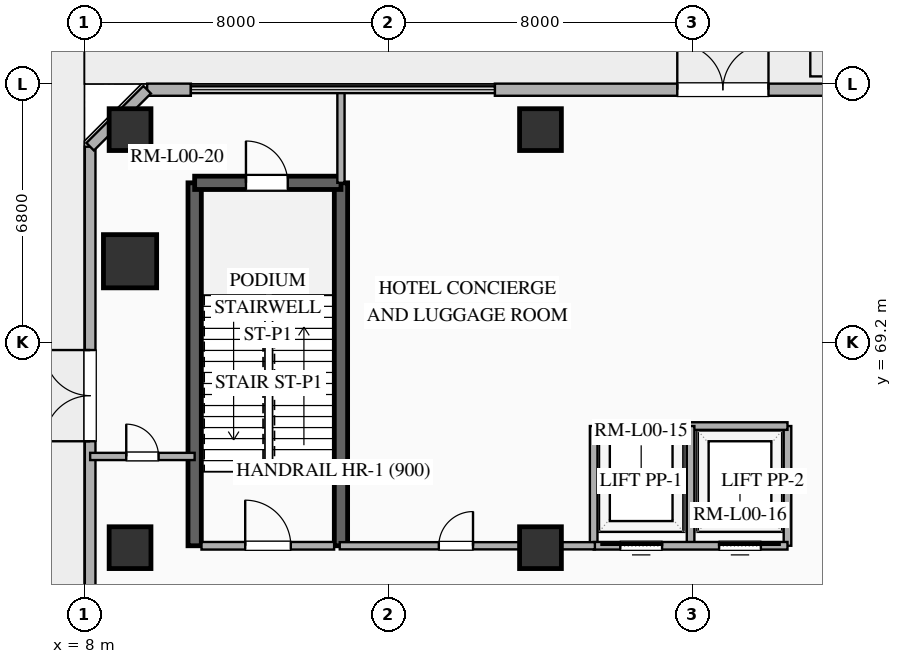
"""IFC4 building model, lengths in metres.
Left out: names, types, materials, properties, quantities, classifications, styles, units other than length and angle.
Written with IfcOpenShell. Run it as: python <this file> out.ifc"""

import sys

from ifc_helpers import new_model, si_unit, direction, frame, frame_2d, origin, origin_2d, place, context, subcontext, project, spatial, rectangle, extrude, element, fill, save


model = new_model("IFC4")
c1 = context("Model", 3, precision=1e-05, world=origin(), true_north=direction((0.0, 1.0)))
c2 = subcontext(c1, "Body", "Model", "MODEL_VIEW")
j1 = project(units=[si_unit("LENGTHUNIT", "METRE"), si_unit("PLANEANGLEUNIT", "RADIAN")], contexts=[c1])
p1 = place(None, origin())
s1 = spatial("IfcSite", under=j1, at=p1, CompositionType="ELEMENT")
p2 = place(p1, origin())
s2 = spatial("IfcBuilding", under=s1, at=p2, CompositionType="ELEMENT")
p3 = place(p2, origin())
s3 = spatial("IfcBuildingStorey", under=s2, at=p3, CompositionType="ELEMENT", Elevation=0.0)
for number, where, z_axis, x_axis in (
    (1, (9.2, 74.8, 0.0), (0.0, 0.0, 1.0), (1.0, 0.0, 0.0)),
    (2, (9.2, 63.8, 0.0), (0.0, 0.0, 1.0), (1.0, 0.0, 0.0)),
    (3, (20.0, 74.8, 0.0), (0.0, 0.0, 1.0), (1.0, 0.0, 0.0)),
    (4, (20.0, 63.8, 0.0), (0.0, 0.0, 1.0), (1.0, 0.0, 0.0)),
):
    element("IfcColumn", number, at=place(p3, frame(where, z_axis=z_axis, x_axis=x_axis)), inside=s3, PredefinedType="COLUMN", context=c2, shape_type="SweptSolid", body=[
        extrude(rectangle(XDim=1.1, YDim=1.1, at=origin_2d()), origin(), (0.0, 0.0, 1.0), 5.72),
    ])
p4 = place(p3, frame((9.2, 71.337, 0.0), z_axis=(0.0, 0.0, 1.0), x_axis=(1.0, 0.0, 0.0)))
e5 = element("IfcColumn", 5, at=p4, inside=s3, PredefinedType="COLUMN", context=c2, shape_type="SweptSolid", body=[
    extrude(rectangle(XDim=1.4, YDim=1.4, at=origin_2d()), origin(), (0.0, 0.0, 1.0), 5.72),
])
for number, where, z_axis, x_axis in (
    (6, (10.9, 63.85, 0.0), (0.0, 0.0, 1.0), (0.0, 1.0, 0.0)),
    (7, (14.75, 63.85, 0.0), (0.0, 0.0, 1.0), (0.0, 1.0, 0.0)),
):
    element("IfcWall", number, at=place(p3, frame(where, z_axis=z_axis, x_axis=x_axis)), inside=s3, PredefinedType="SHEAR", context=c2, shape_type="SweptSolid", body=[
        extrude(rectangle(XDim=9.55, YDim=0.35, at=frame_2d((4.775, 0.0))), origin(), (0.0, 0.0, 1.0), 5.72),
    ])
p5 = place(p3, frame((10.9, 73.4, 0.0), z_axis=(0.0, 0.0, 1.0), x_axis=(1.0, 0.0, 0.0)))
e8 = element("IfcWall", 8, at=p5, inside=s3, PredefinedType="SHEAR", context=c2, shape_type="SweptSolid", body=[
    extrude(rectangle(XDim=3.85, YDim=0.35, at=frame_2d((1.925, 0.0))), origin(), (0.0, 0.0, 1.0), 5.72),
])
p6 = place(p5, frame((1.35, 0.0, 0.0)))
e9 = element("IfcOpeningElement", 9, at=p6, cuts=e8, PredefinedType="OPENING", context=c2, shape_type="SweptSolid", body=[
    extrude(rectangle(XDim=1.1, YDim=2.15, at=frame_2d((0.55, 1.075))), frame((0.0, 0.185, 0.0), z_axis=(0.0, -1.0, 0.0), x_axis=(1.0, 0.0, 0.0)), (0.0, 0.0, 1.0), 0.37),
])
p7 = place(p3, frame((10.8, 75.85, 0.0), z_axis=(0.0, 0.0, 1.0), x_axis=(-1.0, 0.0, 0.0)))
e10 = element("IfcWall", 10, at=p7, inside=s3, PredefinedType="SOLIDWALL", context=c2, shape_type="SweptSolid", body=[
    extrude(rectangle(XDim=1.15, YDim=0.32, at=frame_2d((0.575, 0.0))), origin(), (0.0, 0.0, 1.0), 5.72),
])
p8 = place(p3, frame((18.8, 75.85, 0.0), z_axis=(0.0, 0.0, 1.0), x_axis=(1.0, 0.0, 0.0)))
e11 = element("IfcWall", 11, at=p8, inside=s3, PredefinedType="SOLIDWALL", context=c2, shape_type="SweptSolid", body=[
    extrude(rectangle(XDim=10.55, YDim=0.32, at=frame_2d((5.275, 0.0))), origin(), (0.0, 0.0, 1.0), 5.72),
])
p9 = place(p8, frame((4.8, 0.0, 0.0)))
e12 = element("IfcOpeningElement", 12, at=p9, cuts=e11, PredefinedType="OPENING", context=c2, shape_type="SweptSolid", body=[
    extrude(rectangle(XDim=2.4, YDim=2.6, at=frame_2d((1.2, 1.3))), frame((0.0, 0.17, 0.0), z_axis=(0.0, -1.0, 0.0), x_axis=(1.0, 0.0, 0.0)), (0.0, 0.0, 1.0), 0.34),
])
p10 = place(p3, frame((8.15, 33.0, 0.0), z_axis=(0.0, 0.0, 1.0), x_axis=(0.0, 1.0, 0.0)))
e13 = element("IfcWall", 13, at=p10, inside=s3, PredefinedType="SOLIDWALL", context=c2, shape_type="SweptSolid", body=[
    extrude(rectangle(XDim=41.35, YDim=0.28, at=frame_2d((20.675, 0.0))), origin(), (0.0, 0.0, 1.0), 5.72),
])
p11 = place(p10, frame((33.6, 0.0, 0.0)))
e14 = element("IfcOpeningElement", 14, at=p11, cuts=e13, PredefinedType="OPENING", context=c2, shape_type="SweptSolid", body=[
    extrude(rectangle(XDim=2.4, YDim=2.6, at=frame_2d((1.2, 1.3))), frame((0.0, 0.15, 0.0), z_axis=(0.0, -1.0, 0.0), x_axis=(1.0, 0.0, 0.0)), (0.0, 0.0, 1.0), 0.3),
])
p12 = place(p10, frame((7.675, 0.0, 0.9)))
e15 = element("IfcOpeningElement", 15, at=p12, cuts=e13, PredefinedType="OPENING", context=c2, shape_type="SweptSolid", body=[
    extrude(rectangle(XDim=2.4, YDim=2.6, at=frame_2d((1.2, 1.3))), frame((0.0, 0.15, 0.0), z_axis=(0.0, -1.0, 0.0), x_axis=(1.0, 0.0, 0.0)), (0.0, 0.0, 1.0), 0.3),
])
p13 = place(p10, frame((21.225, 0.0, 0.9)))
e16 = element("IfcOpeningElement", 16, at=p13, cuts=e13, PredefinedType="OPENING", context=c2, shape_type="SweptSolid", body=[
    extrude(rectangle(XDim=2.4, YDim=2.6, at=frame_2d((1.2, 1.3))), frame((0.0, 0.15, 0.0), z_axis=(0.0, -1.0, 0.0), x_axis=(1.0, 0.0, 0.0)), (0.0, 0.0, 1.0), 0.3),
])
p14 = place(p3, frame((9.65, 75.85, 0.0), z_axis=(0.0, 0.0, 1.0), x_axis=(-0.707106781187, -0.707106781187, 0.0)))
e17 = element("IfcWall", 17, at=p14, inside=s3, PredefinedType="SOLIDWALL", context=c2, shape_type="SweptSolid", body=[
    extrude(rectangle(XDim=2.121, YDim=0.28, at=frame_2d((1.061, 0.0))), origin(), (0.0, 0.0, 1.0), 5.72),
])
p15 = place(p3, frame((11.08, 63.85, 0.0), z_axis=(0.0, 0.0, 1.0), x_axis=(1.0, 0.0, 0.0)))
e18 = element("IfcWall", 18, at=p15, inside=s3, PredefinedType="SOLIDWALL", context=c2, shape_type="SweptSolid", body=[
    extrude(rectangle(XDim=3.49, YDim=0.2, at=frame_2d((1.745, 0.0))), origin(), (0.0, 0.0, 1.0), 4.92),
])
p16 = place(p15, frame((1.15, 0.0, 0.0)))
e19 = element("IfcOpeningElement", 19, at=p16, cuts=e18, PredefinedType="OPENING", context=c2, shape_type="SweptSolid", body=[
    extrude(rectangle(XDim=1.2, YDim=2.15, at=frame_2d((0.6, 1.075))), frame((0.0, 0.11, 0.0), z_axis=(0.0, -1.0, 0.0), x_axis=(1.0, 0.0, 0.0)), (0.0, 0.0, 1.0), 0.22),
])
for number, where, z_axis, x_axis in (
    (20, (21.4, 63.85, 0.0), (0.0, 0.0, 1.0), (0.0, 1.0, 0.0)),
    (21, (26.5, 63.85, 0.0), (0.0, 0.0, 1.0), (0.0, 1.0, 0.0)),
):
    element("IfcWall", number, at=place(p3, frame(where, z_axis=z_axis, x_axis=x_axis)), inside=s3, PredefinedType="SOLIDWALL", context=c2, shape_type="SweptSolid", body=[
        extrude(rectangle(XDim=3.15, YDim=0.2, at=frame_2d((1.575, 0.0))), origin(), (0.0, 0.0, 1.0), 4.92),
    ])
p17 = place(p3, frame((21.4, 67.0, 0.0), z_axis=(0.0, 0.0, 1.0), x_axis=(1.0, 0.0, 0.0)))
e22 = element("IfcWall", 22, at=p17, inside=s3, PredefinedType="SOLIDWALL", context=c2, shape_type="SweptSolid", body=[
    extrude(rectangle(XDim=5.1, YDim=0.2, at=frame_2d((2.55, 0.0))), origin(), (0.0, 0.0, 1.0), 4.92),
])
p18 = place(p3, frame((23.95, 63.85, 0.0), z_axis=(0.0, 0.0, 1.0), x_axis=(0.0, 1.0, 0.0)))
e23 = element("IfcWall", 23, at=p18, inside=s3, PredefinedType="SOLIDWALL", context=c2, shape_type="SweptSolid", body=[
    extrude(rectangle(XDim=3.15, YDim=0.2, at=frame_2d((1.575, 0.0))), origin(), (0.0, 0.0, 1.0), 4.92),
])
p19 = place(p3, frame((21.4, 63.85, 0.0), z_axis=(0.0, 0.0, 1.0), x_axis=(1.0, 0.0, 0.0)))
e24 = element("IfcWall", 24, at=p19, inside=s3, PredefinedType="SOLIDWALL", context=c2, shape_type="SweptSolid", body=[
    extrude(rectangle(XDim=5.1, YDim=0.2, at=frame_2d((2.55, 0.0))), origin(), (0.0, 0.0, 1.0), 4.92),
])
p20 = place(p19, frame((0.7, 0.0, 0.0)))
e25 = element("IfcOpeningElement", 25, at=p20, cuts=e24, PredefinedType="OPENING", context=c2, shape_type="SweptSolid", body=[
    extrude(rectangle(XDim=1.1, YDim=2.2, at=frame_2d((0.55, 1.1))), frame((0.0, 0.11, 0.0), z_axis=(0.0, -1.0, 0.0), x_axis=(1.0, 0.0, 0.0)), (0.0, 0.0, 1.0), 0.22),
])
p21 = place(p19, frame((3.3, 0.0, 0.0)))
e26 = element("IfcOpeningElement", 26, at=p21, cuts=e24, PredefinedType="OPENING", context=c2, shape_type="SweptSolid", body=[
    extrude(rectangle(XDim=1.1, YDim=2.2, at=frame_2d((0.55, 1.1))), frame((0.0, 0.11, 0.0), z_axis=(0.0, -1.0, 0.0), x_axis=(1.0, 0.0, 0.0)), (0.0, 0.0, 1.0), 0.22),
])
p22 = place(p3, frame((14.718, 63.85, 0.0), z_axis=(0.0, 0.0, 1.0), x_axis=(1.0, 0.0, 0.0)))
e27 = element("IfcWall", 27, at=p22, inside=s3, PredefinedType="PARTITIONING", context=c2, shape_type="SweptSolid", body=[
    extrude(rectangle(XDim=6.714, YDim=0.19, at=frame_2d((3.357, 0.0))), origin(), (0.0, 0.0, 1.0), 4.92),
])
p23 = place(p22, frame((2.607, 0.0, 0.0)))
e28 = element("IfcOpeningElement", 28, at=p23, cuts=e27, PredefinedType="OPENING", context=c2, shape_type="SweptSolid", body=[
    extrude(rectangle(XDim=0.9, YDim=2.15, at=frame_2d((0.45, 1.075))), frame((0.0, 0.105, 0.0), z_axis=(0.0, -1.0, 0.0), x_axis=(1.0, 0.0, 0.0)), (0.0, 0.0, 1.0), 0.21),
])
p24 = place(p3, frame((8.15, 66.2, 0.0), z_axis=(0.0, 0.0, 1.0), x_axis=(1.0, 0.0, 0.0)))
e29 = element("IfcWall", 29, at=p24, inside=s3, PredefinedType="PARTITIONING", context=c2, shape_type="SweptSolid", body=[
    extrude(rectangle(XDim=2.75, YDim=0.19, at=frame_2d((1.375, 0.0))), origin(), (0.0, 0.0, 1.0), 4.92),
])
p25 = place(p24, frame((0.95, 0.0, 0.0)))
e30 = element("IfcOpeningElement", 30, at=p25, cuts=e29, PredefinedType="OPENING", context=c2, shape_type="SweptSolid", body=[
    extrude(rectangle(XDim=0.85, YDim=2.15, at=frame_2d((0.425, 1.075))), frame((0.0, 0.105, 0.0), z_axis=(0.0, -1.0, 0.0), x_axis=(1.0, 0.0, 0.0)), (0.0, 0.0, 1.0), 0.21),
])
p26 = place(p3, frame((14.75, 75.85, 0.0), z_axis=(0.0, 0.0, 1.0), x_axis=(0.0, -1.0, 0.0)))
e31 = element("IfcWall", 31, at=p26, inside=s3, PredefinedType="PARTITIONING", context=c2, shape_type="SweptSolid", body=[
    extrude(rectangle(XDim=2.45, YDim=0.19, at=frame_2d((1.225, 0.0))), origin(), (0.0, 0.0, 1.0), 4.92),
])
p27 = place(p9, origin())
e32 = element("IfcDoor", 32, at=p27, inside=s3, OperationType="DOUBLE_DOOR_SINGLE_SWING", PredefinedType="DOOR", context=c2, shape_type="SweptSolid", body=[
    extrude(rectangle(XDim=2.4, YDim=2.6, at=frame_2d((1.2, 1.3))), frame((0.0, 0.025, 0.0), z_axis=(0.0, -1.0, 0.0), x_axis=(1.0, 0.0, 0.0)), (0.0, 0.0, 1.0), 0.05),
])
fill(e12, e32)
p28 = place(p11, origin())
e33 = element("IfcDoor", 33, at=p28, inside=s3, OperationType="DOUBLE_DOOR_SINGLE_SWING", PredefinedType="DOOR", context=c2, shape_type="SweptSolid", body=[
    extrude(rectangle(XDim=2.4, YDim=2.6, at=frame_2d((1.2, 1.3))), frame((0.0, 0.025, 0.0), z_axis=(0.0, -1.0, 0.0), x_axis=(1.0, 0.0, 0.0)), (0.0, 0.0, 1.0), 0.05),
])
fill(e14, e33)
p29 = place(p6, origin())
e34 = element("IfcDoor", 34, at=p29, inside=s3, OperationType="SINGLE_SWING_LEFT", PredefinedType="DOOR", context=c2, shape_type="SweptSolid", body=[
    extrude(rectangle(XDim=1.1, YDim=2.15, at=frame_2d((0.55, 1.075))), frame((0.0, 0.025, 0.0), z_axis=(0.0, -1.0, 0.0), x_axis=(1.0, 0.0, 0.0)), (0.0, 0.0, 1.0), 0.05),
])
fill(e9, e34)
p30 = place(p16, origin())
e35 = element("IfcDoor", 35, at=p30, inside=s3, OperationType="SINGLE_SWING_LEFT", PredefinedType="DOOR", context=c2, shape_type="SweptSolid", body=[
    extrude(rectangle(XDim=1.2, YDim=2.15, at=frame_2d((0.6, 1.075))), frame((0.0, 0.025, 0.0), z_axis=(0.0, -1.0, 0.0), x_axis=(1.0, 0.0, 0.0)), (0.0, 0.0, 1.0), 0.05),
])
fill(e19, e35)
p31 = place(p20, origin())
e36 = element("IfcDoor", 36, at=p31, inside=s3, OperationType="SLIDING_TO_LEFT", PredefinedType="DOOR", context=c2, shape_type="SweptSolid", body=[
    extrude(rectangle(XDim=1.1, YDim=2.2, at=frame_2d((0.55, 1.1))), frame((0.0, 0.025, 0.0), z_axis=(0.0, -1.0, 0.0), x_axis=(1.0, 0.0, 0.0)), (0.0, 0.0, 1.0), 0.05),
])
fill(e25, e36)
p32 = place(p21, origin())
e37 = element("IfcDoor", 37, at=p32, inside=s3, OperationType="SLIDING_TO_RIGHT", PredefinedType="DOOR", context=c2, shape_type="SweptSolid", body=[
    extrude(rectangle(XDim=1.1, YDim=2.2, at=frame_2d((0.55, 1.1))), frame((0.0, 0.025, 0.0), z_axis=(0.0, -1.0, 0.0), x_axis=(1.0, 0.0, 0.0)), (0.0, 0.0, 1.0), 0.05),
])
fill(e26, e37)
p33 = place(p23, origin())
e38 = element("IfcDoor", 38, at=p33, inside=s3, OperationType="SINGLE_SWING_RIGHT", PredefinedType="DOOR", context=c2, shape_type="SweptSolid", body=[
    extrude(rectangle(XDim=0.9, YDim=2.15, at=frame_2d((0.45, 1.075))), frame((0.0, 0.025, 0.0), z_axis=(0.0, -1.0, 0.0), x_axis=(1.0, 0.0, 0.0)), (0.0, 0.0, 1.0), 0.05),
])
fill(e28, e38)
p34 = place(p25, origin())
e39 = element("IfcDoor", 39, at=p34, inside=s3, OperationType="SINGLE_SWING_LEFT", PredefinedType="DOOR", context=c2, shape_type="SweptSolid", body=[
    extrude(rectangle(XDim=0.85, YDim=2.15, at=frame_2d((0.425, 1.075))), frame((0.0, 0.025, 0.0), z_axis=(0.0, -1.0, 0.0), x_axis=(1.0, 0.0, 0.0)), (0.0, 0.0, 1.0), 0.05),
])
fill(e30, e39)
save(model, sys.argv[1])
